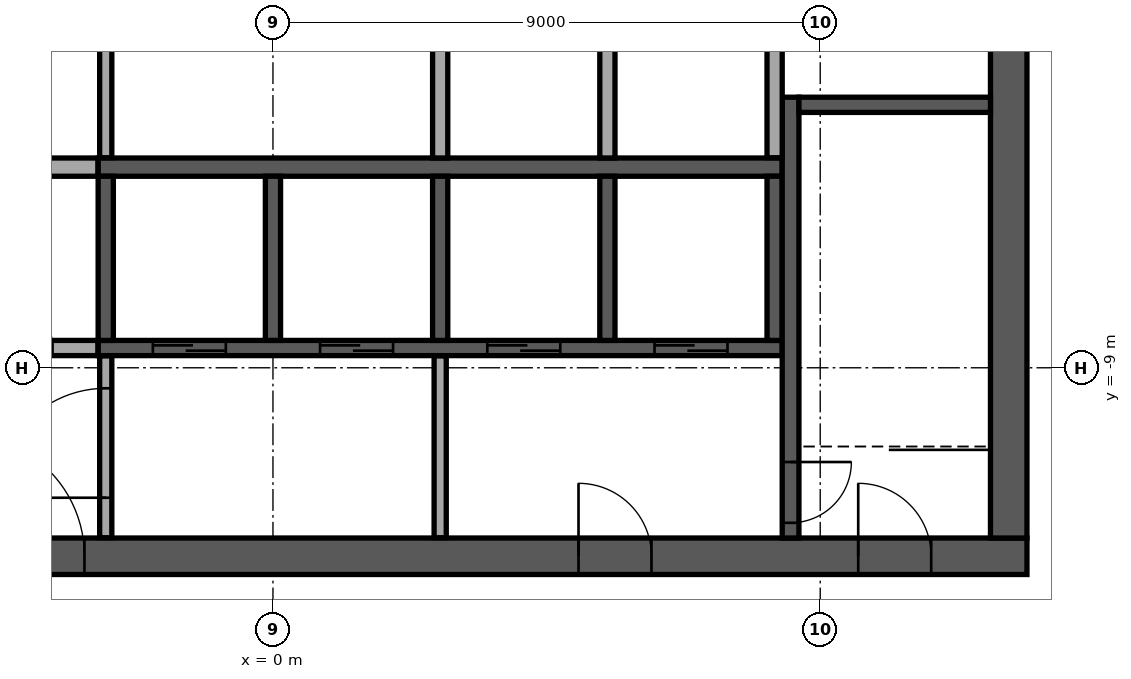
"""IFC4 building model, lengths in metres.
Left out: names, types, materials, properties, quantities, classifications, styles, units other than length and angle.
Written with IfcOpenShell. Run it as: python <this file> out.ifc"""

import sys

from ifc_helpers import new_model, si_unit, direction, frame, frame_2d, origin, place, context, subcontext, project, spatial, rectangle, extrude, element, fill, save


model = new_model("IFC4")
c1 = context("Model", 3, precision=1e-05, world=origin(), true_north=direction((0.0, 1.0)))
c2 = subcontext(c1, "Body", "Model", "MODEL_VIEW")
j1 = project(units=[si_unit("LENGTHUNIT", "METRE"), si_unit("PLANEANGLEUNIT", "RADIAN")], contexts=[c1])
p1 = place(None, origin())
s1 = spatial("IfcSite", under=j1, at=p1, CompositionType="ELEMENT")
p2 = place(p1, origin())
s2 = spatial("IfcBuilding", under=s1, at=p2, CompositionType="ELEMENT")
p3 = place(p2, frame((0.0, 0.0, 373.1)))
s3 = spatial("IfcBuildingStorey", under=s2, at=p3, CompositionType="ELEMENT", Elevation=373.1)
p4 = place(p3, frame((-12.4, -12.1, 0.0), z_axis=(0.0, 0.0, 1.0), x_axis=(1.0, 0.0, 0.0)))
e1 = element("IfcWall", 1, at=p4, inside=s3, PredefinedType="SHEAR", context=c2, shape_type="SweptSolid", body=[
    extrude(rectangle(XDim=24.8, YDim=0.6, at=frame_2d((12.4, 0.0))), origin(), (0.0, 0.0, 1.0), 3.2),
])
p5 = place(p4, frame((7.3, 0.0, 0.0)))
e2 = element("IfcOpeningElement", 2, at=p5, cuts=e1, PredefinedType="OPENING", context=c2, shape_type="SweptSolid", body=[
    extrude(rectangle(XDim=2.0, YDim=2.1, at=frame_2d((1.0, 1.05))), frame((0.0, 0.31, 0.0), z_axis=(0.0, -1.0, 0.0), x_axis=(1.0, 0.0, 0.0)), (0.0, 0.0, 1.0), 0.62),
])
p6 = place(p4, frame((17.425, 0.0, 0.0)))
e3 = element("IfcOpeningElement", 3, at=p6, cuts=e1, PredefinedType="OPENING", context=c2, shape_type="SweptSolid", body=[
    extrude(rectangle(XDim=1.2, YDim=2.1, at=frame_2d((0.6, 1.05))), frame((0.0, 0.31, 0.0), z_axis=(0.0, -1.0, 0.0), x_axis=(1.0, 0.0, 0.0)), (0.0, 0.0, 1.0), 0.62),
])
p7 = place(p4, frame((1.575, 0.0, 0.0)))
e4 = element("IfcOpeningElement", 4, at=p7, cuts=e1, PredefinedType="OPENING", context=c2, shape_type="SweptSolid", body=[
    extrude(rectangle(XDim=1.2, YDim=2.1, at=frame_2d((0.6, 1.05))), frame((0.0, 0.31, 0.0), z_axis=(0.0, -1.0, 0.0), x_axis=(1.0, 0.0, 0.0)), (0.0, 0.0, 1.0), 0.62),
])
p8 = place(p4, frame((22.025, 0.0, 0.0)))
e5 = element("IfcOpeningElement", 5, at=p8, cuts=e1, PredefinedType="OPENING", context=c2, shape_type="SweptSolid", body=[
    extrude(rectangle(XDim=1.2, YDim=2.1, at=frame_2d((0.6, 1.05))), frame((0.0, 0.31, 0.0), z_axis=(0.0, -1.0, 0.0), x_axis=(1.0, 0.0, 0.0)), (0.0, 0.0, 1.0), 0.62),
])
p9 = place(p3, frame((12.1, -11.8, 0.0), z_axis=(0.0, 0.0, 1.0), x_axis=(0.0, 1.0, 0.0)))
e6 = element("IfcWall", 6, at=p9, inside=s3, PredefinedType="SHEAR", context=c2, shape_type="SweptSolid", body=[
    extrude(rectangle(XDim=23.6, YDim=0.6, at=frame_2d((11.8, 0.0))), origin(), (0.0, 0.0, 1.0), 3.2),
])
p10 = place(p9, frame((10.6, 0.0, 0.0)))
e7 = element("IfcOpeningElement", 7, at=p10, cuts=e6, PredefinedType="OPENING", context=c2, shape_type="SweptSolid", body=[
    extrude(rectangle(XDim=2.4, YDim=2.4, at=frame_2d((1.2, 1.2))), frame((0.0, 0.31, 0.0), z_axis=(0.0, -1.0, 0.0), x_axis=(1.0, 0.0, 0.0)), (0.0, 0.0, 1.0), 0.62),
])
p11 = place(p3, frame((-2.875, -5.7, 0.0), z_axis=(0.0, 0.0, 1.0), x_axis=(1.0, 0.0, 0.0)))
e8 = element("IfcWall", 8, at=p11, inside=s3, PredefinedType="SOLIDWALL", context=c2, shape_type="SweptSolid", body=[
    extrude(rectangle(XDim=11.25, YDim=0.3, at=frame_2d((5.625, 0.0))), origin(), (0.0, 0.0, 1.0), 3.2),
])
for number, where, z_axis, x_axis in (
    (9, (2.75, -5.55, 0.0), (0.0, 0.0, 1.0), (0.0, 1.0, 0.0)),
    (10, (5.5, -5.55, 0.0), (0.0, 0.0, 1.0), (0.0, 1.0, 0.0)),
):
    element("IfcWall", number, at=place(p3, frame(where, z_axis=z_axis, x_axis=x_axis)), inside=s3, PredefinedType="SOLIDWALL", context=c2, shape_type="SweptSolid", body=[
        extrude(rectangle(XDim=2.7, YDim=0.25, at=frame_2d((1.35, 0.0))), origin(), (0.0, 0.0, 1.0), 3.2),
    ])
p12 = place(p3, frame((-2.875, -8.675, 0.0), z_axis=(0.0, 0.0, 1.0), x_axis=(1.0, 0.0, 0.0)))
e11 = element("IfcWall", 11, at=p12, inside=s3, PredefinedType="SOLIDWALL", context=c2, shape_type="SweptSolid", body=[
    extrude(rectangle(XDim=11.25, YDim=0.25, at=frame_2d((5.625, 0.0))), origin(), (0.0, 0.0, 1.0), 3.2),
])
p13 = place(p12, frame((0.9, 0.0, 0.0)))
e12 = element("IfcOpeningElement", 12, at=p13, cuts=e11, PredefinedType="OPENING", context=c2, shape_type="SweptSolid", body=[
    extrude(rectangle(XDim=1.2, YDim=2.1, at=frame_2d((0.6, 1.05))), frame((0.0, 0.135, 0.0), z_axis=(0.0, -1.0, 0.0), x_axis=(1.0, 0.0, 0.0)), (0.0, 0.0, 1.0), 0.27),
])
p14 = place(p12, frame((3.65, 0.0, 0.0)))
e13 = element("IfcOpeningElement", 13, at=p14, cuts=e11, PredefinedType="OPENING", context=c2, shape_type="SweptSolid", body=[
    extrude(rectangle(XDim=1.2, YDim=2.1, at=frame_2d((0.6, 1.05))), frame((0.0, 0.135, 0.0), z_axis=(0.0, -1.0, 0.0), x_axis=(1.0, 0.0, 0.0)), (0.0, 0.0, 1.0), 0.27),
])
p15 = place(p12, frame((6.4, 0.0, 0.0)))
e14 = element("IfcOpeningElement", 14, at=p15, cuts=e11, PredefinedType="OPENING", context=c2, shape_type="SweptSolid", body=[
    extrude(rectangle(XDim=1.2, YDim=2.1, at=frame_2d((0.6, 1.05))), frame((0.0, 0.135, 0.0), z_axis=(0.0, -1.0, 0.0), x_axis=(1.0, 0.0, 0.0)), (0.0, 0.0, 1.0), 0.27),
])
p16 = place(p12, frame((9.15, 0.0, 0.0)))
e15 = element("IfcOpeningElement", 15, at=p16, cuts=e11, PredefinedType="OPENING", context=c2, shape_type="SweptSolid", body=[
    extrude(rectangle(XDim=1.2, YDim=2.1, at=frame_2d((0.6, 1.05))), frame((0.0, 0.135, 0.0), z_axis=(0.0, -1.0, 0.0), x_axis=(1.0, 0.0, 0.0)), (0.0, 0.0, 1.0), 0.27),
])
for number, where, z_axis, x_axis in (
    (16, (-2.75, -8.55, 0.0), (0.0, 0.0, 1.0), (0.0, 1.0, 0.0)),
    (17, (0.0, -8.55, 0.0), (0.0, 0.0, 1.0), (0.0, 1.0, 0.0)),
    (18, (2.75, -8.55, 0.0), (0.0, 0.0, 1.0), (0.0, 1.0, 0.0)),
    (19, (5.5, -8.55, 0.0), (0.0, 0.0, 1.0), (0.0, 1.0, 0.0)),
    (20, (8.25, -8.55, 0.0), (0.0, 0.0, 1.0), (0.0, 1.0, 0.0)),
):
    element("IfcWall", number, at=place(p3, frame(where, z_axis=z_axis, x_axis=x_axis)), inside=s3, PredefinedType="SOLIDWALL", context=c2, shape_type="SweptSolid", body=[
        extrude(rectangle(XDim=2.7, YDim=0.25, at=frame_2d((1.35, 0.0))), origin(), (0.0, 0.0, 1.0), 3.2),
    ])
p17 = place(p3, frame((8.512, -4.55, 0.0), z_axis=(0.0, 0.0, 1.0), x_axis=(0.0, -1.0, 0.0)))
e21 = element("IfcWall", 21, at=p17, inside=s3, PredefinedType="SOLIDWALL", context=c2, shape_type="SweptSolid", body=[
    extrude(rectangle(XDim=7.25, YDim=0.275, at=frame_2d((3.625, 0.0))), origin(), (0.0, 0.0, 1.0), 3.2),
])
p18 = place(p17, frame((6.0, 0.0, 0.0)))
e22 = element("IfcOpeningElement", 22, at=p18, cuts=e21, PredefinedType="OPENING", context=c2, shape_type="SweptSolid", body=[
    extrude(rectangle(XDim=1.0, YDim=2.1, at=frame_2d((0.5, 1.05))), frame((0.0, 0.147, 0.0), z_axis=(0.0, -1.0, 0.0), x_axis=(1.0, 0.0, 0.0)), (0.0, 0.0, 1.0), 0.295),
])
p19 = place(p3, frame((8.65, -4.675, 0.0), z_axis=(0.0, 0.0, 1.0), x_axis=(1.0, 0.0, 0.0)))
e23 = element("IfcWall", 23, at=p19, inside=s3, PredefinedType="SOLIDWALL", context=c2, shape_type="SweptSolid", body=[
    extrude(rectangle(XDim=3.15, YDim=0.25, at=frame_2d((1.575, 0.0))), origin(), (0.0, 0.0, 1.0), 3.2),
])
p20 = place(p3, frame((-2.75, -11.795, 0.0), z_axis=(0.0, 0.0, 1.0), x_axis=(0.0, 1.0, 0.0)))
e24 = element("IfcWall", 24, at=p20, inside=s3, PredefinedType="PARTITIONING", context=c2, shape_type="SweptSolid", body=[
    extrude(rectangle(XDim=2.99, YDim=0.2, at=frame_2d((1.495, 0.0))), origin(), (0.0, 0.0, 1.0), 3.2),
])
p21 = place(p20, frame((0.657, 0.0, 0.0)))
e25 = element("IfcOpeningElement", 25, at=p21, cuts=e24, PredefinedType="OPENING", context=c2, shape_type="SweptSolid", body=[
    extrude(rectangle(XDim=1.8, YDim=2.1, at=frame_2d((0.9, 1.05))), frame((0.0, 0.11, 0.0), z_axis=(0.0, -1.0, 0.0), x_axis=(1.0, 0.0, 0.0)), (0.0, 0.0, 1.0), 0.22),
])
p22 = place(p3, frame((2.75, -11.795, 0.0), z_axis=(0.0, 0.0, 1.0), x_axis=(0.0, 1.0, 0.0)))
e26 = element("IfcWall", 26, at=p22, inside=s3, PredefinedType="PARTITIONING", context=c2, shape_type="SweptSolid", body=[
    extrude(rectangle(XDim=2.99, YDim=0.2, at=frame_2d((1.495, 0.0))), origin(), (0.0, 0.0, 1.0), 3.2),
])
p23 = place(p3, frame((-8.37, -8.675, 0.0), z_axis=(0.0, 0.0, 1.0), x_axis=(1.0, 0.0, 0.0)))
e27 = element("IfcWall", 27, at=p23, inside=s3, PredefinedType="PARTITIONING", context=c2, shape_type="SweptSolid", body=[
    extrude(rectangle(XDim=5.49, YDim=0.25, at=frame_2d((2.745, 0.0))), origin(), (0.0, 0.0, 1.0), 3.2),
])
p24 = place(p23, frame((0.995, 0.0, 0.0)))
e28 = element("IfcOpeningElement", 28, at=p24, cuts=e27, PredefinedType="OPENING", context=c2, shape_type="SweptSolid", body=[
    extrude(rectangle(XDim=1.0, YDim=2.1, at=frame_2d((0.5, 1.05))), frame((0.0, 0.135, 0.0), z_axis=(0.0, -1.0, 0.0), x_axis=(1.0, 0.0, 0.0)), (0.0, 0.0, 1.0), 0.27),
])
p25 = place(p23, frame((3.745, 0.0, 0.0)))
e29 = element("IfcOpeningElement", 29, at=p25, cuts=e27, PredefinedType="OPENING", context=c2, shape_type="SweptSolid", body=[
    extrude(rectangle(XDim=1.0, YDim=2.1, at=frame_2d((0.5, 1.05))), frame((0.0, 0.135, 0.0), z_axis=(0.0, -1.0, 0.0), x_axis=(1.0, 0.0, 0.0)), (0.0, 0.0, 1.0), 0.27),
])
p26 = place(p3, frame((-8.35, -5.7, 0.0), z_axis=(0.0, 0.0, 1.0), x_axis=(1.0, 0.0, 0.0)))
e30 = element("IfcWall", 30, at=p26, inside=s3, PredefinedType="PARTITIONING", context=c2, shape_type="SweptSolid", body=[
    extrude(rectangle(XDim=5.47, YDim=0.3, at=frame_2d((2.735, 0.0))), origin(), (0.0, 0.0, 1.0), 3.2),
])
p27 = place(p3, frame((-2.75, -5.545, 0.0), z_axis=(0.0, 0.0, 1.0), x_axis=(0.0, 1.0, 0.0)))
e31 = element("IfcWall", 31, at=p27, inside=s3, PredefinedType="PARTITIONING", context=c2, shape_type="SweptSolid", body=[
    extrude(rectangle(XDim=2.69, YDim=0.2, at=frame_2d((1.345, 0.0))), origin(), (0.0, 0.0, 1.0), 3.2),
])
p28 = place(p3, frame((8.25, -5.545, 0.0), z_axis=(0.0, 0.0, 1.0), x_axis=(0.0, 1.0, 0.0)))
e32 = element("IfcWall", 32, at=p28, inside=s3, PredefinedType="PARTITIONING", context=c2, shape_type="SweptSolid", body=[
    extrude(rectangle(XDim=2.69, YDim=0.25, at=frame_2d((1.345, 0.0))), origin(), (0.0, 0.0, 1.0), 3.2),
])
p29 = place(p5, origin())
e33 = element("IfcDoor", 33, at=p29, inside=s3, OperationType="SINGLE_SWING_LEFT", PredefinedType="DOOR", context=c2, shape_type="SweptSolid", body=[
    extrude(rectangle(XDim=2.0, YDim=2.1, at=frame_2d((1.0, 1.05))), frame((0.0, 0.025, 0.0), z_axis=(0.0, -1.0, 0.0), x_axis=(1.0, 0.0, 0.0)), (0.0, 0.0, 1.0), 0.05),
])
fill(e2, e33)
p30 = place(p6, origin())
e34 = element("IfcDoor", 34, at=p30, inside=s3, OperationType="SINGLE_SWING_LEFT", PredefinedType="DOOR", context=c2, shape_type="SweptSolid", body=[
    extrude(rectangle(XDim=1.2, YDim=2.1, at=frame_2d((0.6, 1.05))), frame((0.0, 0.025, 0.0), z_axis=(0.0, -1.0, 0.0), x_axis=(1.0, 0.0, 0.0)), (0.0, 0.0, 1.0), 0.05),
])
fill(e3, e34)
p31 = place(p8, origin())
e35 = element("IfcDoor", 35, at=p31, inside=s3, OperationType="SINGLE_SWING_LEFT", PredefinedType="DOOR", context=c2, shape_type="SweptSolid", body=[
    extrude(rectangle(XDim=1.2, YDim=2.1, at=frame_2d((0.6, 1.05))), frame((0.0, 0.025, 0.0), z_axis=(0.0, -1.0, 0.0), x_axis=(1.0, 0.0, 0.0)), (0.0, 0.0, 1.0), 0.05),
])
fill(e5, e35)
p32 = place(p13, origin())
e36 = element("IfcDoor", 36, at=p32, inside=s3, OperationType="DOUBLE_DOOR_SLIDING", PredefinedType="DOOR", context=c2, shape_type="SweptSolid", body=[
    extrude(rectangle(XDim=1.2, YDim=2.1, at=frame_2d((0.6, 1.05))), frame((0.0, 0.025, 0.0), z_axis=(0.0, -1.0, 0.0), x_axis=(1.0, 0.0, 0.0)), (0.0, 0.0, 1.0), 0.05),
])
fill(e12, e36)
p33 = place(p14, origin())
e37 = element("IfcDoor", 37, at=p33, inside=s3, OperationType="DOUBLE_DOOR_SLIDING", PredefinedType="DOOR", context=c2, shape_type="SweptSolid", body=[
    extrude(rectangle(XDim=1.2, YDim=2.1, at=frame_2d((0.6, 1.05))), frame((0.0, 0.025, 0.0), z_axis=(0.0, -1.0, 0.0), x_axis=(1.0, 0.0, 0.0)), (0.0, 0.0, 1.0), 0.05),
])
fill(e13, e37)
p34 = place(p15, origin())
e38 = element("IfcDoor", 38, at=p34, inside=s3, OperationType="DOUBLE_DOOR_SLIDING", PredefinedType="DOOR", context=c2, shape_type="SweptSolid", body=[
    extrude(rectangle(XDim=1.2, YDim=2.1, at=frame_2d((0.6, 1.05))), frame((0.0, 0.025, 0.0), z_axis=(0.0, -1.0, 0.0), x_axis=(1.0, 0.0, 0.0)), (0.0, 0.0, 1.0), 0.05),
])
fill(e14, e38)
p35 = place(p16, origin())
e39 = element("IfcDoor", 39, at=p35, inside=s3, OperationType="DOUBLE_DOOR_SLIDING", PredefinedType="DOOR", context=c2, shape_type="SweptSolid", body=[
    extrude(rectangle(XDim=1.2, YDim=2.1, at=frame_2d((0.6, 1.05))), frame((0.0, 0.025, 0.0), z_axis=(0.0, -1.0, 0.0), x_axis=(1.0, 0.0, 0.0)), (0.0, 0.0, 1.0), 0.05),
])
fill(e15, e39)
p36 = place(p18, origin())
e40 = element("IfcDoor", 40, at=p36, inside=s3, OperationType="SINGLE_SWING_LEFT", PredefinedType="DOOR", context=c2, shape_type="SweptSolid", body=[
    extrude(rectangle(XDim=1.0, YDim=2.1, at=frame_2d((0.5, 1.05))), frame((0.0, 0.025, 0.0), z_axis=(0.0, -1.0, 0.0), x_axis=(1.0, 0.0, 0.0)), (0.0, 0.0, 1.0), 0.05),
])
fill(e22, e40)
p37 = place(p21, origin())
e41 = element("IfcDoor", 41, at=p37, inside=s3, OperationType="SINGLE_SWING_LEFT", PredefinedType="DOOR", context=c2, shape_type="SweptSolid", body=[
    extrude(rectangle(XDim=1.8, YDim=2.1, at=frame_2d((0.9, 1.05))), frame((0.0, 0.025, 0.0), z_axis=(0.0, -1.0, 0.0), x_axis=(1.0, 0.0, 0.0)), (0.0, 0.0, 1.0), 0.05),
])
fill(e25, e41)
save(model, sys.argv[1])
